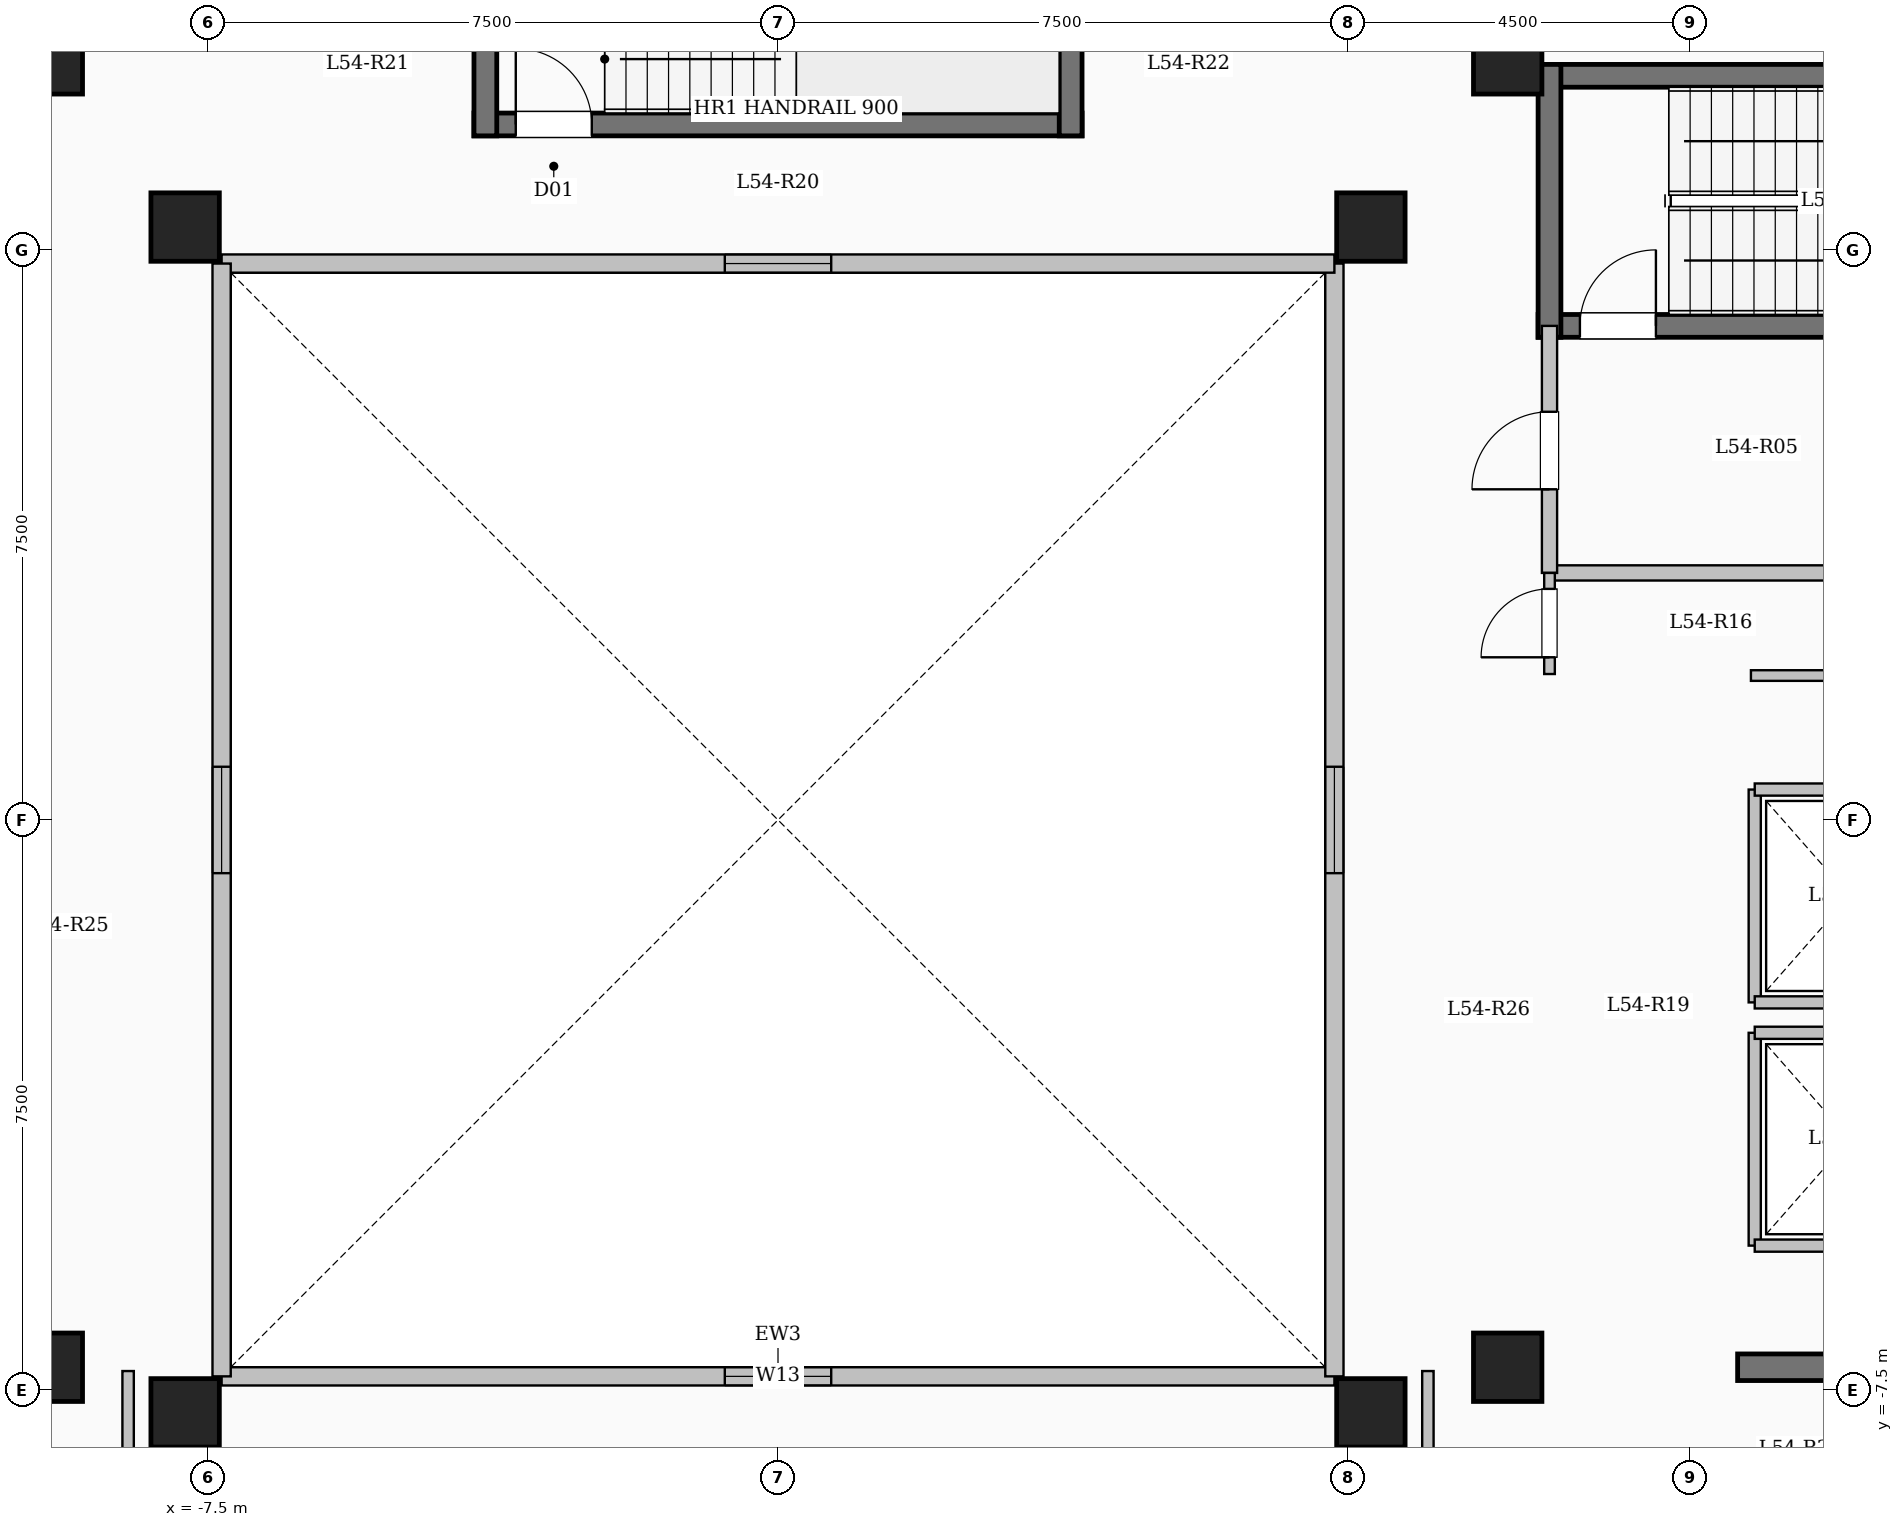
"""IFC4 building model, lengths in metres.
Left out: names, types, materials, properties, quantities, classifications, styles, units other than length and angle.
Written with IfcOpenShell. Run it as: python <this file> out.ifc"""

import sys

from ifc_helpers import new_model, si_unit, direction, frame, frame_2d, origin, origin_2d, place, context, subcontext, project, spatial, rectangle, extrude, element, fill, save


model = new_model("IFC4")
c1 = context("Model", 3, precision=1e-05, world=origin(), true_north=direction((0.0, 1.0)))
c2 = subcontext(c1, "Body", "Model", "MODEL_VIEW")
j1 = project(units=[si_unit("LENGTHUNIT", "METRE"), si_unit("PLANEANGLEUNIT", "RADIAN")], contexts=[c1])
p1 = place(None, origin())
s1 = spatial("IfcSite", under=j1, at=p1, CompositionType="ELEMENT")
p2 = place(p1, origin())
s2 = spatial("IfcBuilding", under=s1, at=p2, CompositionType="ELEMENT")
p3 = place(p2, frame((0.0, 0.0, 200.3)))
s3 = spatial("IfcBuildingStorey", under=s2, at=p3, CompositionType="ELEMENT", Elevation=200.3)
for number, where, z_axis, x_axis in (
    (1, (-7.8, -7.8, 0.0), (0.0, 0.0, 1.0), (1.0, 0.0, 0.0)),
    (2, (7.8, -7.8, 0.0), (0.0, 0.0, 1.0), (1.0, 0.0, 0.0)),
    (3, (-7.8, 7.8, 0.0), (0.0, 0.0, 1.0), (1.0, 0.0, 0.0)),
    (4, (7.8, 7.8, 0.0), (0.0, 0.0, 1.0), (1.0, 0.0, 0.0)),
    (5, (-9.6, -7.2, 0.0), (0.0, 0.0, 1.0), (1.0, 0.0, 0.0)),
    (6, (-9.6, 10.0, 0.0), (0.0, 0.0, 1.0), (1.0, 0.0, 0.0)),
    (7, (9.6, -7.2, 0.0), (0.0, 0.0, 1.0), (1.0, 0.0, 0.0)),
    (8, (9.6, 10.0, 0.0), (0.0, 0.0, 1.0), (1.0, 0.0, 0.0)),
):
    element("IfcColumn", number, at=place(p3, frame(where, z_axis=z_axis, x_axis=x_axis)), inside=s3, PredefinedType="COLUMN", context=c2, shape_type="SweptSolid", body=[
        extrude(rectangle(XDim=0.9, YDim=0.9, at=origin_2d()), origin(), (0.0, 0.0, 1.0), 3.35),
    ])
p4 = place(p3, frame((-7.32, -7.32, 0.0), z_axis=(0.0, 0.0, 1.0), x_axis=(1.0, 0.0, 0.0)))
e9 = element("IfcWall", 9, at=p4, inside=s3, PredefinedType="SOLIDWALL", context=c2, shape_type="SweptSolid", body=[
    extrude(rectangle(XDim=14.64, YDim=0.24, at=frame_2d((7.32, 0.0))), origin(), (0.0, 0.0, 1.0), 3.1),
])
p5 = place(p4, frame((6.62, 0.0, 0.95)))
e10 = element("IfcOpeningElement", 10, at=p5, cuts=e9, PredefinedType="OPENING", context=c2, shape_type="SweptSolid", body=[
    extrude(rectangle(XDim=1.4, YDim=1.5, at=frame_2d((0.7, 0.75))), frame((0.0, 0.13, 0.0), z_axis=(0.0, -1.0, 0.0), x_axis=(1.0, 0.0, 0.0)), (0.0, 0.0, 1.0), 0.26),
])
p6 = place(p3, frame((7.32, -7.32, 0.0), z_axis=(0.0, 0.0, 1.0), x_axis=(0.0, 1.0, 0.0)))
e11 = element("IfcWall", 11, at=p6, inside=s3, PredefinedType="SOLIDWALL", context=c2, shape_type="SweptSolid", body=[
    extrude(rectangle(XDim=14.64, YDim=0.24, at=frame_2d((7.32, 0.0))), origin(), (0.0, 0.0, 1.0), 3.1),
])
p7 = place(p6, frame((6.62, 0.0, 0.95)))
e12 = element("IfcOpeningElement", 12, at=p7, cuts=e11, PredefinedType="OPENING", context=c2, shape_type="SweptSolid", body=[
    extrude(rectangle(XDim=1.4, YDim=1.5, at=frame_2d((0.7, 0.75))), frame((0.0, 0.13, 0.0), z_axis=(0.0, -1.0, 0.0), x_axis=(1.0, 0.0, 0.0)), (0.0, 0.0, 1.0), 0.26),
])
p8 = place(p3, frame((7.32, 7.32, 0.0), z_axis=(0.0, 0.0, 1.0), x_axis=(-1.0, 0.0, 0.0)))
e13 = element("IfcWall", 13, at=p8, inside=s3, PredefinedType="SOLIDWALL", context=c2, shape_type="SweptSolid", body=[
    extrude(rectangle(XDim=14.64, YDim=0.24, at=frame_2d((7.32, 0.0))), origin(), (0.0, 0.0, 1.0), 3.1),
])
p9 = place(p8, frame((6.62, 0.0, 0.95)))
e14 = element("IfcOpeningElement", 14, at=p9, cuts=e13, PredefinedType="OPENING", context=c2, shape_type="SweptSolid", body=[
    extrude(rectangle(XDim=1.4, YDim=1.5, at=frame_2d((0.7, 0.75))), frame((0.0, 0.13, 0.0), z_axis=(0.0, -1.0, 0.0), x_axis=(1.0, 0.0, 0.0)), (0.0, 0.0, 1.0), 0.26),
])
p10 = place(p3, frame((-7.32, 7.32, 0.0), z_axis=(0.0, 0.0, 1.0), x_axis=(0.0, -1.0, 0.0)))
e15 = element("IfcWall", 15, at=p10, inside=s3, PredefinedType="SOLIDWALL", context=c2, shape_type="SweptSolid", body=[
    extrude(rectangle(XDim=14.64, YDim=0.24, at=frame_2d((7.32, 0.0))), origin(), (0.0, 0.0, 1.0), 3.1),
])
p11 = place(p10, frame((6.62, 0.0, 0.95)))
e16 = element("IfcOpeningElement", 16, at=p11, cuts=e15, PredefinedType="OPENING", context=c2, shape_type="SweptSolid", body=[
    extrude(rectangle(XDim=1.4, YDim=1.5, at=frame_2d((0.7, 0.75))), frame((0.0, 0.13, 0.0), z_axis=(0.0, -1.0, 0.0), x_axis=(1.0, 0.0, 0.0)), (0.0, 0.0, 1.0), 0.26),
])
p12 = place(p3, frame((10.0, 9.79, 0.0), z_axis=(0.0, 0.0, 1.0), x_axis=(1.0, 0.0, 0.0)))
e17 = element("IfcWall", 17, at=p12, inside=s3, PredefinedType="SHEAR", context=c2, shape_type="SweptSolid", body=[
    extrude(rectangle(XDim=8.0, YDim=0.3, at=frame_2d((4.0, 0.0))), origin(), (0.0, 0.0, 1.0), 3.35),
])
p13 = place(p3, frame((10.0, 6.5, 0.0), z_axis=(0.0, 0.0, 1.0), x_axis=(1.0, 0.0, 0.0)))
e18 = element("IfcWall", 18, at=p13, inside=s3, PredefinedType="SHEAR", context=c2, shape_type="SweptSolid", body=[
    extrude(rectangle(XDim=8.0, YDim=0.3, at=frame_2d((4.0, 0.0))), origin(), (0.0, 0.0, 1.0), 3.35),
])
p14 = place(p13, frame((0.55, 0.0, 0.0)))
e19 = element("IfcOpeningElement", 19, at=p14, cuts=e18, PredefinedType="OPENING", context=c2, shape_type="SweptSolid", body=[
    extrude(rectangle(XDim=1.0, YDim=2.15, at=frame_2d((0.5, 1.075))), frame((0.0, 0.16, 0.0), z_axis=(0.0, -1.0, 0.0), x_axis=(1.0, 0.0, 0.0)), (0.0, 0.0, 1.0), 0.32),
])
p15 = place(p3, frame((10.15, 6.35, 0.0), z_axis=(0.0, 0.0, 1.0), x_axis=(0.0, 1.0, 0.0)))
e20 = element("IfcWall", 20, at=p15, inside=s3, PredefinedType="SHEAR", context=c2, shape_type="SweptSolid", body=[
    extrude(rectangle(XDim=3.59, YDim=0.3, at=frame_2d((1.795, 0.0))), origin(), (0.0, 0.0, 1.0), 3.35),
])
p16 = place(p3, frame((-4.0, 9.15, 0.0), z_axis=(0.0, 0.0, 1.0), x_axis=(1.0, 0.0, 0.0)))
e21 = element("IfcWall", 21, at=p16, inside=s3, PredefinedType="SHEAR", context=c2, shape_type="SweptSolid", body=[
    extrude(rectangle(XDim=8.0, YDim=0.3, at=frame_2d((4.0, 0.0))), origin(), (0.0, 0.0, 1.0), 3.35),
])
p17 = place(p16, frame((0.55, 0.0, 0.0)))
e22 = element("IfcOpeningElement", 22, at=p17, cuts=e21, PredefinedType="OPENING", context=c2, shape_type="SweptSolid", body=[
    extrude(rectangle(XDim=1.0, YDim=2.15, at=frame_2d((0.5, 1.075))), frame((0.0, 0.16, 0.0), z_axis=(0.0, -1.0, 0.0), x_axis=(1.0, 0.0, 0.0)), (0.0, 0.0, 1.0), 0.32),
])
for number, where, z_axis, x_axis in (
    (23, (-3.85, 9.0, 0.0), (0.0, 0.0, 1.0), (0.0, 1.0, 0.0)),
    (24, (3.85, 9.0, 0.0), (0.0, 0.0, 1.0), (0.0, 1.0, 0.0)),
):
    element("IfcWall", number, at=place(p3, frame(where, z_axis=z_axis, x_axis=x_axis)), inside=s3, PredefinedType="SHEAR", context=c2, shape_type="SweptSolid", body=[
        extrude(rectangle(XDim=3.59, YDim=0.3, at=frame_2d((1.795, 0.0))), origin(), (0.0, 0.0, 1.0), 3.35),
    ])
p18 = place(p3, frame((10.15, 3.25, 0.0), z_axis=(0.0, 0.0, 1.0), x_axis=(1.0, 0.0, 0.0)))
e25 = element("IfcWall", 25, at=p18, inside=s3, PredefinedType="SOLIDWALL", context=c2, shape_type="SweptSolid", body=[
    extrude(rectangle(XDim=5.4, YDim=0.2, at=frame_2d((2.7, 0.0))), origin(), (0.0, 0.0, 1.0), 3.1),
])
p19 = place(p3, frame((10.15, 3.25, 0.0), z_axis=(0.0, 0.0, 1.0), x_axis=(0.0, 1.0, 0.0)))
e26 = element("IfcWall", 26, at=p19, inside=s3, PredefinedType="SOLIDWALL", context=c2, shape_type="SweptSolid", body=[
    extrude(rectangle(XDim=3.25, YDim=0.2, at=frame_2d((1.625, 0.0))), origin(), (0.0, 0.0, 1.0), 3.1),
])
p20 = place(p19, frame((1.1, 0.0, 0.0)))
e27 = element("IfcOpeningElement", 27, at=p20, cuts=e26, PredefinedType="OPENING", context=c2, shape_type="SweptSolid", body=[
    extrude(rectangle(XDim=1.02, YDim=2.15, at=frame_2d((0.51, 1.075))), frame((0.0, 0.11, 0.0), z_axis=(0.0, -1.0, 0.0), x_axis=(1.0, 0.0, 0.0)), (0.0, 0.0, 1.0), 0.22),
])
p21 = place(p3, frame((12.85, -5.6, 0.0), z_axis=(0.0, 0.0, 1.0), x_axis=(0.0, 1.0, 0.0)))
e28 = element("IfcWall", 28, at=p21, inside=s3, PredefinedType="SOLIDWALL", context=c2, shape_type="SweptSolid", body=[
    extrude(rectangle(XDim=2.8, YDim=0.16, at=frame_2d((1.4, 0.0))), origin(), (0.0, 0.0, 1.0), 3.1),
])
for number, where, z_axis, x_axis in (
    (29, (12.85, -5.6, 0.0), (0.0, 0.0, 1.0), (1.0, 0.0, 0.0)),
    (30, (12.85, -2.8, 0.0), (0.0, 0.0, 1.0), (1.0, 0.0, 0.0)),
):
    element("IfcWall", number, at=place(p3, frame(where, z_axis=z_axis, x_axis=x_axis)), inside=s3, PredefinedType="SOLIDWALL", context=c2, shape_type="SweptSolid", body=[
        extrude(rectangle(XDim=2.5, YDim=0.16, at=frame_2d((1.25, 0.0))), origin(), (0.0, 0.0, 1.0), 3.1),
    ])
p22 = place(p3, frame((12.85, -2.4, 0.0), z_axis=(0.0, 0.0, 1.0), x_axis=(0.0, 1.0, 0.0)))
e31 = element("IfcWall", 31, at=p22, inside=s3, PredefinedType="SOLIDWALL", context=c2, shape_type="SweptSolid", body=[
    extrude(rectangle(XDim=2.8, YDim=0.16, at=frame_2d((1.4, 0.0))), origin(), (0.0, 0.0, 1.0), 3.1),
])
for number, where, z_axis, x_axis in (
    (32, (12.85, -2.4, 0.0), (0.0, 0.0, 1.0), (1.0, 0.0, 0.0)),
    (33, (12.85, 0.4, 0.0), (0.0, 0.0, 1.0), (1.0, 0.0, 0.0)),
):
    element("IfcWall", number, at=place(p3, frame(where, z_axis=z_axis, x_axis=x_axis)), inside=s3, PredefinedType="SOLIDWALL", context=c2, shape_type="SweptSolid", body=[
        extrude(rectangle(XDim=2.5, YDim=0.16, at=frame_2d((1.25, 0.0))), origin(), (0.0, 0.0, 1.0), 3.1),
    ])
p23 = place(p3, frame((12.625, -7.2, 0.0), z_axis=(0.0, 0.0, 1.0), x_axis=(1.0, 0.0, 0.0)))
e34 = element("IfcWall", 34, at=p23, inside=s3, PredefinedType="SHEAR", context=c2, shape_type="SweptSolid", body=[
    extrude(rectangle(XDim=6.0, YDim=0.35, at=frame_2d((3.0, 0.0))), origin(), (0.0, 0.0, 1.0), 3.35),
])
p24 = place(p3, frame((12.8, 1.9, 0.0), z_axis=(0.0, 0.0, 1.0), x_axis=(1.0, 0.0, 0.0)))
e35 = element("IfcWall", 35, at=p24, inside=s3, PredefinedType="PARTITIONING", context=c2, shape_type="SweptSolid", body=[
    extrude(rectangle(XDim=2.6, YDim=0.14, at=frame_2d((1.3, 0.0))), origin(), (0.0, 0.0, 1.0), 3.1),
])
p25 = place(p3, frame((10.15, 1.92, 0.0), z_axis=(0.0, 0.0, 1.0), x_axis=(0.0, 1.0, 0.0)))
e36 = element("IfcWall", 36, at=p25, inside=s3, PredefinedType="PARTITIONING", context=c2, shape_type="SweptSolid", body=[
    extrude(rectangle(XDim=1.33, YDim=0.14, at=frame_2d((0.665, 0.0))), origin(), (0.0, 0.0, 1.0), 3.1),
])
p26 = place(p25, frame((0.22, 0.0, 0.0)))
e37 = element("IfcOpeningElement", 37, at=p26, cuts=e36, PredefinedType="OPENING", context=c2, shape_type="SweptSolid", body=[
    extrude(rectangle(XDim=0.9, YDim=2.08, at=frame_2d((0.45, 1.04))), frame((0.0, 0.08, 0.0), z_axis=(0.0, -1.0, 0.0), x_axis=(1.0, 0.0, 0.0)), (0.0, 0.0, 1.0), 0.16),
])
for number, where, z_axis, x_axis in (
    (38, (-8.55, -9.4, 0.0), (0.0, 0.0, 1.0), (0.0, 1.0, 0.0)),
    (39, (8.55, -9.4, 0.0), (0.0, 0.0, 1.0), (0.0, 1.0, 0.0)),
):
    element("IfcWall", number, at=place(p3, frame(where, z_axis=z_axis, x_axis=x_axis)), inside=s3, PredefinedType="PARTITIONING", context=c2, shape_type="SweptSolid", body=[
        extrude(rectangle(XDim=2.15, YDim=0.15, at=frame_2d((1.075, 0.0))), origin(), (0.0, 0.0, 1.0), 3.1),
    ])
p27 = place(p5, origin())
e40 = element("IfcWindow", 40, at=p27, inside=s3, PartitioningType="SINGLE_PANEL", PredefinedType="WINDOW", context=c2, shape_type="SweptSolid", body=[
    extrude(rectangle(XDim=1.4, YDim=1.5, at=frame_2d((0.7, 0.75))), frame((0.0, 0.03, 0.0), z_axis=(0.0, -1.0, 0.0), x_axis=(1.0, 0.0, 0.0)), (0.0, 0.0, 1.0), 0.06),
])
fill(e10, e40)
p28 = place(p7, origin())
e41 = element("IfcWindow", 41, at=p28, inside=s3, PartitioningType="SINGLE_PANEL", PredefinedType="WINDOW", context=c2, shape_type="SweptSolid", body=[
    extrude(rectangle(XDim=1.4, YDim=1.5, at=frame_2d((0.7, 0.75))), frame((0.0, 0.03, 0.0), z_axis=(0.0, -1.0, 0.0), x_axis=(1.0, 0.0, 0.0)), (0.0, 0.0, 1.0), 0.06),
])
fill(e12, e41)
p29 = place(p9, origin())
e42 = element("IfcWindow", 42, at=p29, inside=s3, PartitioningType="SINGLE_PANEL", PredefinedType="WINDOW", context=c2, shape_type="SweptSolid", body=[
    extrude(rectangle(XDim=1.4, YDim=1.5, at=frame_2d((0.7, 0.75))), frame((0.0, 0.03, 0.0), z_axis=(0.0, -1.0, 0.0), x_axis=(1.0, 0.0, 0.0)), (0.0, 0.0, 1.0), 0.06),
])
fill(e14, e42)
p30 = place(p11, origin())
e43 = element("IfcWindow", 43, at=p30, inside=s3, PartitioningType="SINGLE_PANEL", PredefinedType="WINDOW", context=c2, shape_type="SweptSolid", body=[
    extrude(rectangle(XDim=1.4, YDim=1.5, at=frame_2d((0.7, 0.75))), frame((0.0, 0.03, 0.0), z_axis=(0.0, -1.0, 0.0), x_axis=(1.0, 0.0, 0.0)), (0.0, 0.0, 1.0), 0.06),
])
fill(e16, e43)
p31 = place(p14, origin())
e44 = element("IfcDoor", 44, at=p31, inside=s3, OperationType="SINGLE_SWING_RIGHT", PredefinedType="DOOR", context=c2, shape_type="SweptSolid", body=[
    extrude(rectangle(XDim=1.0, YDim=2.15, at=frame_2d((0.5, 1.075))), frame((0.0, 0.025, 0.0), z_axis=(0.0, -1.0, 0.0), x_axis=(1.0, 0.0, 0.0)), (0.0, 0.0, 1.0), 0.05),
])
fill(e19, e44)
p32 = place(p17, origin())
e45 = element("IfcDoor", 45, at=p32, inside=s3, OperationType="SINGLE_SWING_LEFT", PredefinedType="DOOR", context=c2, shape_type="SweptSolid", body=[
    extrude(rectangle(XDim=1.0, YDim=2.15, at=frame_2d((0.5, 1.075))), frame((0.0, 0.025, 0.0), z_axis=(0.0, -1.0, 0.0), x_axis=(1.0, 0.0, 0.0)), (0.0, 0.0, 1.0), 0.05),
])
fill(e22, e45)
p33 = place(p20, origin())
e46 = element("IfcDoor", 46, at=p33, inside=s3, OperationType="SINGLE_SWING_LEFT", PredefinedType="DOOR", context=c2, shape_type="SweptSolid", body=[
    extrude(rectangle(XDim=1.02, YDim=2.15, at=frame_2d((0.51, 1.075))), frame((0.0, 0.025, 0.0), z_axis=(0.0, -1.0, 0.0), x_axis=(1.0, 0.0, 0.0)), (0.0, 0.0, 1.0), 0.05),
])
fill(e27, e46)
p34 = place(p26, origin())
e47 = element("IfcDoor", 47, at=p34, inside=s3, OperationType="SINGLE_SWING_LEFT", PredefinedType="DOOR", context=c2, shape_type="SweptSolid", body=[
    extrude(rectangle(XDim=0.9, YDim=2.08, at=frame_2d((0.45, 1.04))), frame((0.0, 0.025, 0.0), z_axis=(0.0, -1.0, 0.0), x_axis=(1.0, 0.0, 0.0)), (0.0, 0.0, 1.0), 0.05),
])
fill(e37, e47)
save(model, sys.argv[1])
